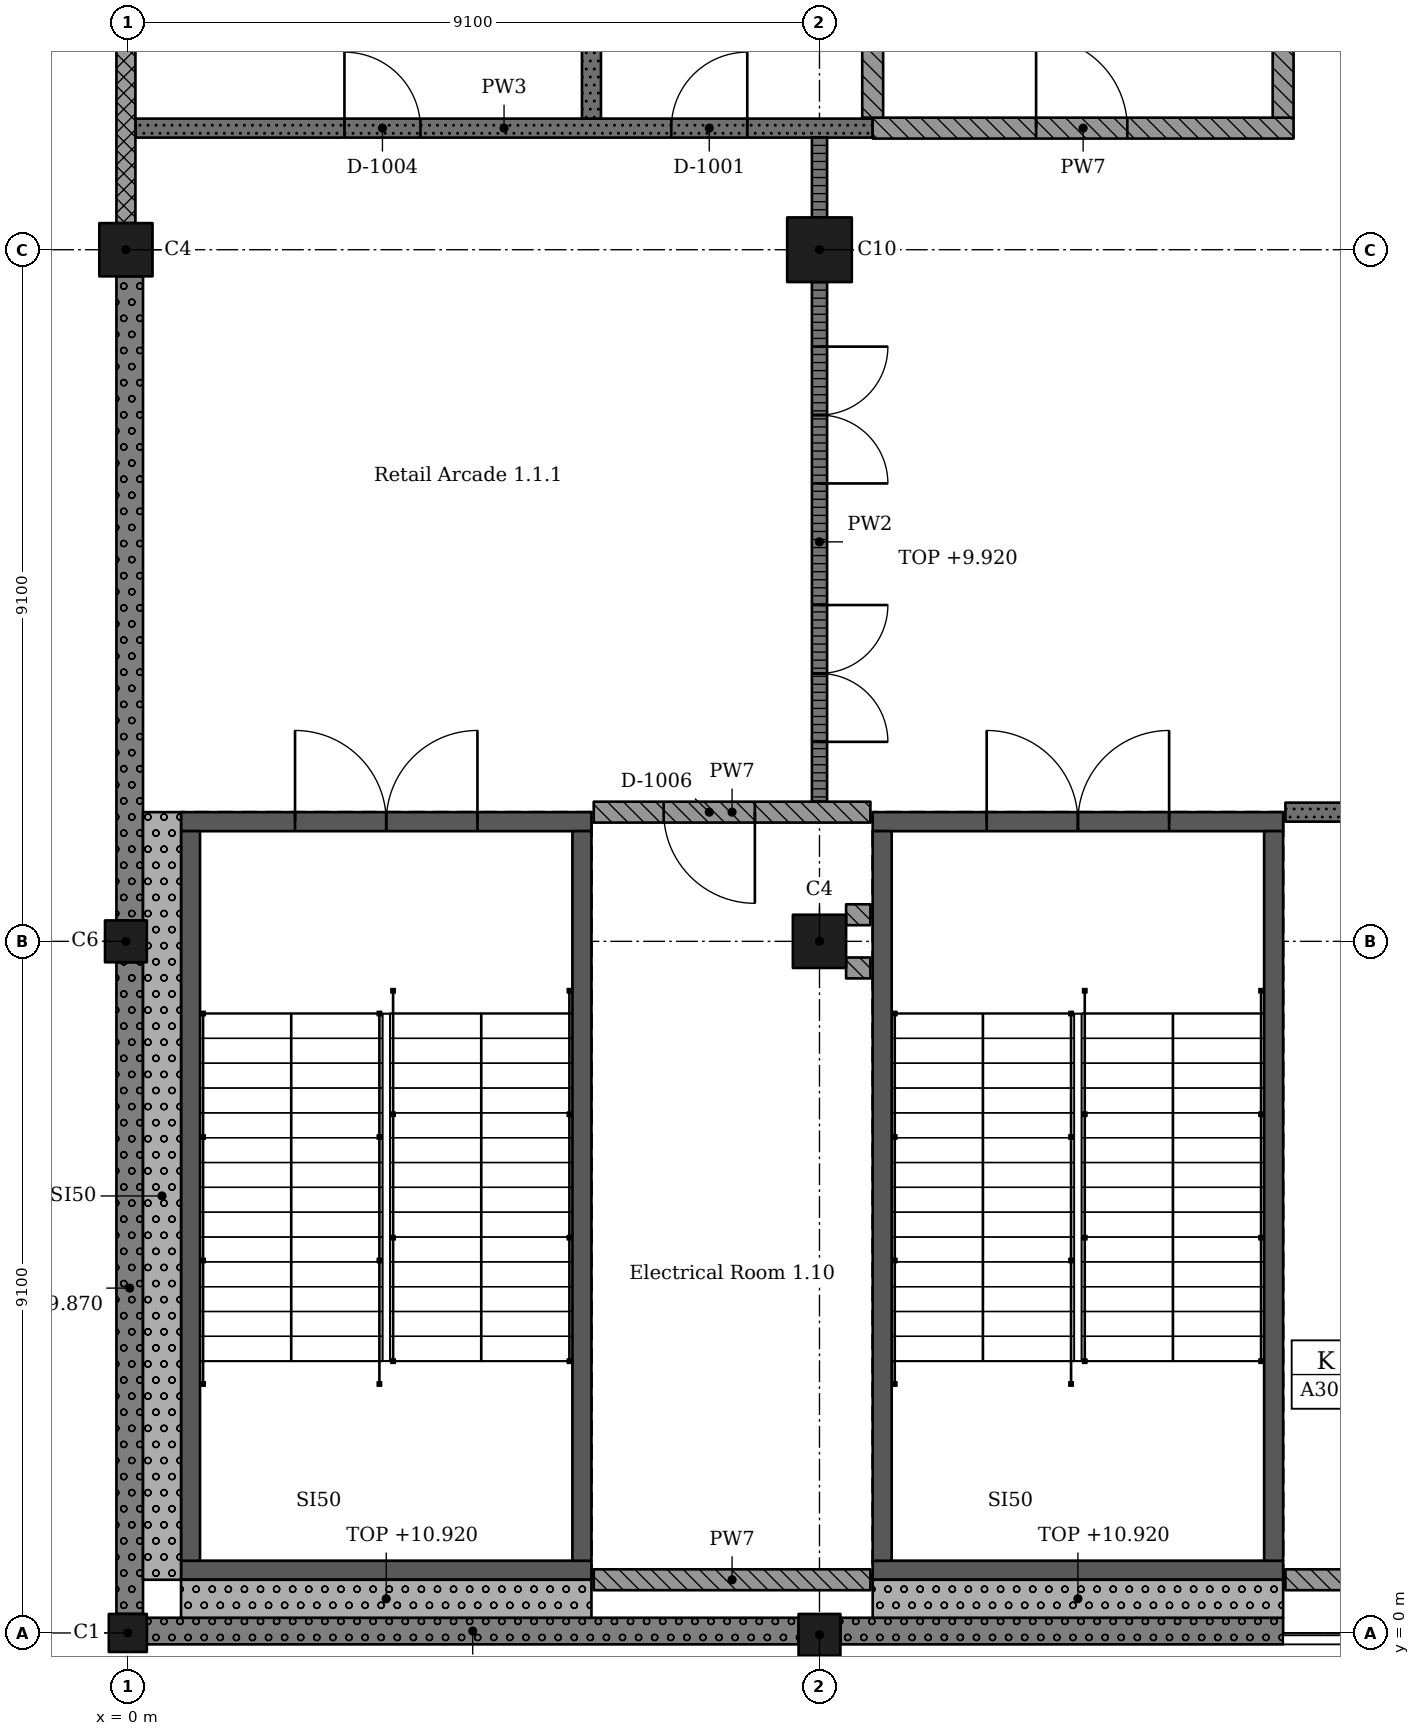
"""IFC4 building model, lengths in metres.
Left out: names, types, materials, properties, quantities, classifications, styles, units other than length and angle.
Written with IfcOpenShell. Run it as: python <this file> out.ifc"""

import sys

from ifc_helpers import new_model, si_unit, direction, frame, frame_2d, origin, origin_with_axes, origin_2d, place, context, subcontext, project, spatial, rectangle, extrude, element, fill, save


model = new_model("IFC4")
c1 = context("Model", 3, precision=1e-05, world=origin(), true_north=direction((0.0, 1.0)))
c2 = subcontext(c1, "Body", "Model", "MODEL_VIEW")
j1 = project(units=[si_unit("LENGTHUNIT", "METRE"), si_unit("PLANEANGLEUNIT", "RADIAN")], contexts=[c1])
p1 = place(None, origin())
s1 = spatial("IfcSite", under=j1, at=p1, CompositionType="ELEMENT")
p2 = place(p1, origin())
s2 = spatial("IfcBuilding", under=s1, at=p2, CompositionType="ELEMENT")
p3 = place(p2, frame((0.0, 0.0, 6.37)))
s3 = spatial("IfcBuildingStorey", under=s2, at=p3, CompositionType="ELEMENT", Elevation=6.37)
p4 = place(p3, origin_with_axes())
e1 = element("IfcColumn", 1, at=p4, inside=s3, PredefinedType="COLUMN", context=c2, shape_type="SweptSolid", body=[
    extrude(rectangle(XDim=0.5, YDim=0.5, at=origin_2d()), origin(), (0.0, 0.0, 1.0), 4.55),
])
p5 = place(p3, frame((-0.025, 9.1, 0.0), z_axis=(0.0, 0.0, 1.0), x_axis=(1.0, 0.0, 0.0)))
e2 = element("IfcColumn", 2, at=p5, inside=s3, PredefinedType="COLUMN", context=c2, shape_type="SweptSolid", body=[
    extrude(rectangle(XDim=0.55, YDim=0.55, at=origin_2d()), origin(), (0.0, 0.0, 1.0), 4.55),
])
p6 = place(p3, frame((-0.025, 18.2, 0.0), z_axis=(0.0, 0.0, 1.0), x_axis=(1.0, 0.0, 0.0)))
e3 = element("IfcColumn", 3, at=p6, inside=s3, PredefinedType="COLUMN", context=c2, shape_type="SweptSolid", body=[
    extrude(rectangle(XDim=0.7, YDim=0.7, at=origin_2d()), origin(), (0.0, 0.0, 1.0), 4.55),
])
p7 = place(p3, frame((9.1, -0.025, 0.0), z_axis=(0.0, 0.0, 1.0), x_axis=(1.0, 0.0, 0.0)))
e4 = element("IfcColumn", 4, at=p7, inside=s3, PredefinedType="COLUMN", context=c2, shape_type="SweptSolid", body=[
    extrude(rectangle(XDim=0.55, YDim=0.55, at=origin_2d()), origin(), (0.0, 0.0, 1.0), 4.55),
])
p8 = place(p3, frame((9.1, 9.1, 0.0), z_axis=(0.0, 0.0, 1.0), x_axis=(1.0, 0.0, 0.0)))
e5 = element("IfcColumn", 5, at=p8, inside=s3, PredefinedType="COLUMN", context=c2, shape_type="SweptSolid", body=[
    extrude(rectangle(XDim=0.7, YDim=0.7, at=origin_2d()), origin(), (0.0, 0.0, 1.0), 4.55),
])
p9 = place(p3, frame((9.1, 18.2, 0.0), z_axis=(0.0, 0.0, 1.0), x_axis=(1.0, 0.0, 0.0)))
e6 = element("IfcColumn", 6, at=p9, inside=s3, PredefinedType="COLUMN", context=c2, shape_type="SweptSolid", body=[
    extrude(rectangle(XDim=0.85, YDim=0.85, at=origin_2d()), origin(), (0.0, 0.0, 1.0), 4.55),
])
p10 = place(p3, frame((6.1, 0.825, 0.0), z_axis=(0.0, 0.0, 1.0), x_axis=(-1.0, 0.0, 0.0)))
e7 = element("IfcWall", 7, at=p10, inside=s3, PredefinedType="SHEAR", context=c2, shape_type="SweptSolid", body=[
    extrude(rectangle(XDim=5.4, YDim=0.25, at=frame_2d((2.7, 0.0))), origin(), (0.0, 0.0, 1.0), 4.55),
])
p11 = place(p3, frame((6.1, 10.675, 0.0), z_axis=(0.0, 0.0, 1.0), x_axis=(-1.0, 0.0, 0.0)))
e8 = element("IfcWall", 8, at=p11, inside=s3, PredefinedType="SHEAR", context=c2, shape_type="SweptSolid", body=[
    extrude(rectangle(XDim=5.4, YDim=0.25, at=frame_2d((2.7, 0.0))), origin(), (0.0, 0.0, 1.0), 4.55),
])
p12 = place(p11, frame((1.5, 0.0, 0.0)))
e9 = element("IfcOpeningElement", 9, at=p12, cuts=e8, PredefinedType="OPENING", context=c2, shape_type="SweptSolid", body=[
    extrude(rectangle(XDim=2.4, YDim=2.1, at=frame_2d((1.2, 1.05))), frame((0.0, 0.135, 0.0), z_axis=(0.0, -1.0, 0.0), x_axis=(1.0, 0.0, 0.0)), (0.0, 0.0, 1.0), 0.27),
])
for number, where, z_axis, x_axis in (
    (10, (0.825, 10.55, 0.0), (0.0, 0.0, 1.0), (0.0, -1.0, 0.0)),
    (11, (5.975, 10.55, 0.0), (0.0, 0.0, 1.0), (0.0, -1.0, 0.0)),
):
    element("IfcWall", number, at=place(p3, frame(where, z_axis=z_axis, x_axis=x_axis)), inside=s3, PredefinedType="SHEAR", context=c2, shape_type="SweptSolid", body=[
        extrude(rectangle(XDim=9.6, YDim=0.25, at=frame_2d((4.8, 0.0))), origin(), (0.0, 0.0, 1.0), 4.55),
    ])
p13 = place(p3, frame((15.2, 0.825, 0.0), z_axis=(0.0, 0.0, 1.0), x_axis=(-1.0, 0.0, 0.0)))
e12 = element("IfcWall", 12, at=p13, inside=s3, PredefinedType="SHEAR", context=c2, shape_type="SweptSolid", body=[
    extrude(rectangle(XDim=5.4, YDim=0.25, at=frame_2d((2.7, 0.0))), origin(), (0.0, 0.0, 1.0), 4.55),
])
p14 = place(p3, frame((15.2, 10.675, 0.0), z_axis=(0.0, 0.0, 1.0), x_axis=(-1.0, 0.0, 0.0)))
e13 = element("IfcWall", 13, at=p14, inside=s3, PredefinedType="SHEAR", context=c2, shape_type="SweptSolid", body=[
    extrude(rectangle(XDim=5.4, YDim=0.25, at=frame_2d((2.7, 0.0))), origin(), (0.0, 0.0, 1.0), 4.55),
])
p15 = place(p14, frame((1.5, 0.0, 0.0)))
e14 = element("IfcOpeningElement", 14, at=p15, cuts=e13, PredefinedType="OPENING", context=c2, shape_type="SweptSolid", body=[
    extrude(rectangle(XDim=2.4, YDim=2.1, at=frame_2d((1.2, 1.05))), frame((0.0, 0.135, 0.0), z_axis=(0.0, -1.0, 0.0), x_axis=(1.0, 0.0, 0.0)), (0.0, 0.0, 1.0), 0.27),
])
for number, where, z_axis, x_axis in (
    (15, (9.925, 10.55, 0.0), (0.0, 0.0, 1.0), (0.0, -1.0, 0.0)),
    (16, (15.075, 10.55, 0.0), (0.0, 0.0, 1.0), (0.0, -1.0, 0.0)),
):
    element("IfcWall", number, at=place(p3, frame(where, z_axis=z_axis, x_axis=x_axis)), inside=s3, PredefinedType="SHEAR", context=c2, shape_type="SweptSolid", body=[
        extrude(rectangle(XDim=9.6, YDim=0.25, at=frame_2d((4.8, 0.0))), origin(), (0.0, 0.0, 1.0), 4.55),
    ])
p16 = place(p3, frame((0.25, 0.025, 0.0), z_axis=(0.0, 0.0, 1.0), x_axis=(1.0, 0.0, 0.0)))
e17 = element("IfcWall", 17, at=p16, inside=s3, PredefinedType="SOLIDWALL", context=c2, shape_type="SweptSolid", body=[
    extrude(rectangle(XDim=8.575, YDim=0.35, at=frame_2d((4.288, 0.0))), origin(), (0.0, 0.0, 1.0), 3.5),
])
p17 = place(p3, frame((9.375, 0.025, 0.0), z_axis=(0.0, 0.0, 1.0), x_axis=(1.0, 0.0, 0.0)))
e18 = element("IfcWall", 18, at=p17, inside=s3, PredefinedType="SOLIDWALL", context=c2, shape_type="SweptSolid", body=[
    extrude(rectangle(XDim=5.825, YDim=0.35, at=frame_2d((2.913, 0.0))), origin(), (0.0, 0.0, 1.0), 3.5),
])
p18 = place(p3, frame((-0.025, 26.95, 0.0), z_axis=(0.0, 0.0, 1.0), x_axis=(0.0, -1.0, 0.0)))
e19 = element("IfcWall", 19, at=p18, inside=s3, PredefinedType="SOLIDWALL", context=c2, shape_type="SweptSolid", body=[
    extrude(rectangle(XDim=8.4, YDim=0.25, at=frame_2d((4.2, 0.0))), origin(), (0.0, 0.0, 1.0), 3.55),
])
p19 = place(p3, frame((0.025, 17.85, 0.0), z_axis=(0.0, 0.0, 1.0), x_axis=(0.0, -1.0, 0.0)))
e20 = element("IfcWall", 20, at=p19, inside=s3, PredefinedType="SOLIDWALL", context=c2, shape_type="SweptSolid", body=[
    extrude(rectangle(XDim=8.475, YDim=0.35, at=frame_2d((4.238, 0.0))), origin(), (0.0, 0.0, 1.0), 3.5),
])
p20 = place(p3, frame((0.025, 8.825, 0.0), z_axis=(0.0, 0.0, 1.0), x_axis=(0.0, -1.0, 0.0)))
e21 = element("IfcWall", 21, at=p20, inside=s3, PredefinedType="SOLIDWALL", context=c2, shape_type="SweptSolid", body=[
    extrude(rectangle(XDim=8.575, YDim=0.35, at=frame_2d((4.288, 0.0))), origin(), (0.0, 0.0, 1.0), 3.5),
])
p21 = place(p3, frame((0.7, 0.45, 0.0), z_axis=(0.0, 0.0, 1.0), x_axis=(1.0, 0.0, 0.0)))
e22 = element("IfcWall", 22, at=p21, inside=s3, PredefinedType="SOLIDWALL", context=c2, shape_type="SweptSolid", body=[
    extrude(rectangle(XDim=5.4, YDim=0.5, at=frame_2d((2.7, 0.0))), origin(), (0.0, 0.0, 1.0), 4.55),
])
p22 = place(p3, frame((0.45, 0.7, 0.0), z_axis=(0.0, 0.0, 1.0), x_axis=(0.0, 1.0, 0.0)))
e23 = element("IfcWall", 23, at=p22, inside=s3, PredefinedType="SOLIDWALL", context=c2, shape_type="SweptSolid", body=[
    extrude(rectangle(XDim=10.1, YDim=0.5, at=frame_2d((5.05, 0.0))), origin(), (0.0, 0.0, 1.0), 4.25),
])
p23 = place(p3, frame((9.8, 0.45, 0.0), z_axis=(0.0, 0.0, 1.0), x_axis=(1.0, 0.0, 0.0)))
e24 = element("IfcWall", 24, at=p23, inside=s3, PredefinedType="SOLIDWALL", context=c2, shape_type="SweptSolid", body=[
    extrude(rectangle(XDim=5.4, YDim=0.5, at=frame_2d((2.7, 0.0))), origin(), (0.0, 0.0, 1.0), 4.55),
])
p24 = place(p3, frame((0.1, 19.8, 0.0), z_axis=(0.0, 0.0, 1.0), x_axis=(1.0, 0.0, 0.0)))
e25 = element("IfcWall", 25, at=p24, inside=s3, PredefinedType="SOLIDWALL", context=c2, shape_type="SweptSolid", body=[
    extrude(rectangle(XDim=9.7, YDim=0.25, at=frame_2d((4.85, 0.0))), origin(), (0.0, 0.0, 1.0), 4.25),
])
p25 = place(p24, frame((7.05, 0.0, 0.0)))
e26 = element("IfcOpeningElement", 26, at=p25, cuts=e25, PredefinedType="OPENING", context=c2, shape_type="SweptSolid", body=[
    extrude(rectangle(XDim=1.0, YDim=2.1, at=frame_2d((0.5, 1.05))), frame((0.0, 0.135, 0.0), z_axis=(0.0, -1.0, 0.0), x_axis=(1.0, 0.0, 0.0)), (0.0, 0.0, 1.0), 0.27),
])
p26 = place(p24, frame((2.75, 0.0, 0.0)))
e27 = element("IfcOpeningElement", 27, at=p26, cuts=e25, PredefinedType="OPENING", context=c2, shape_type="SweptSolid", body=[
    extrude(rectangle(XDim=1.0, YDim=2.1, at=frame_2d((0.5, 1.05))), frame((0.0, 0.135, 0.0), z_axis=(0.0, -1.0, 0.0), x_axis=(1.0, 0.0, 0.0)), (0.0, 0.0, 1.0), 0.27),
])
p27 = place(p3, frame((6.1, 29.775, 0.0), z_axis=(0.0, 0.0, 1.0), x_axis=(0.0, -1.0, 0.0)))
e28 = element("IfcWall", 28, at=p27, inside=s3, PredefinedType="SOLIDWALL", context=c2, shape_type="SweptSolid", body=[
    extrude(rectangle(XDim=9.85, YDim=0.25, at=frame_2d((4.925, 0.0))), origin(), (0.0, 0.0, 1.0), 4.25),
])
p28 = place(p3, frame((6.13, 10.8, 0.0), z_axis=(0.0, 0.0, 1.0), x_axis=(1.0, 0.0, 0.0)))
e29 = element("IfcWall", 29, at=p28, inside=s3, PredefinedType="SOLIDWALL", context=c2, shape_type="SweptSolid", body=[
    extrude(rectangle(XDim=3.64, YDim=0.275, at=frame_2d((1.82, 0.0))), origin(), (0.0, 0.0, 1.0), 4.25),
])
p29 = place(p28, frame((0.92, 0.0, 0.0)))
e30 = element("IfcOpeningElement", 30, at=p29, cuts=e29, PredefinedType="OPENING", context=c2, shape_type="SweptSolid", body=[
    extrude(rectangle(XDim=1.2, YDim=2.4, at=frame_2d((0.6, 1.2))), frame((0.0, 0.147, 0.0), z_axis=(0.0, -1.0, 0.0), x_axis=(1.0, 0.0, 0.0)), (0.0, 0.0, 1.0), 0.295),
])
p30 = place(p3, frame((9.1, 17.775, 0.0), z_axis=(0.0, 0.0, 1.0), x_axis=(0.0, -1.0, 0.0)))
e31 = element("IfcWall", 31, at=p30, inside=s3, PredefinedType="PARTITIONING", context=c2, shape_type="SweptSolid", body=[
    extrude(rectangle(XDim=6.837, YDim=0.2, at=frame_2d((3.419, 0.0))), origin(), (0.0, 0.0, 1.0), 3.55),
])
p31 = place(p30, frame((0.85, 0.0, 0.0)))
e32 = element("IfcOpeningElement", 32, at=p31, cuts=e31, PredefinedType="OPENING", context=c2, shape_type="SweptSolid", body=[
    extrude(rectangle(XDim=1.8, YDim=2.4, at=frame_2d((0.9, 1.2))), frame((0.0, 0.11, 0.0), z_axis=(0.0, -1.0, 0.0), x_axis=(1.0, 0.0, 0.0)), (0.0, 0.0, 1.0), 0.22),
])
p32 = place(p30, frame((4.25, 0.0, 0.0)))
e33 = element("IfcOpeningElement", 33, at=p32, cuts=e31, PredefinedType="OPENING", context=c2, shape_type="SweptSolid", body=[
    extrude(rectangle(XDim=1.8, YDim=2.4, at=frame_2d((0.9, 1.2))), frame((0.0, 0.11, 0.0), z_axis=(0.0, -1.0, 0.0), x_axis=(1.0, 0.0, 0.0)), (0.0, 0.0, 1.0), 0.22),
])
p33 = place(p3, frame((9.1, 19.675, 0.0), z_axis=(0.0, 0.0, 1.0), x_axis=(0.0, -1.0, 0.0)))
e34 = element("IfcWall", 34, at=p33, inside=s3, PredefinedType="PARTITIONING", context=c2, shape_type="SweptSolid", body=[
    extrude(rectangle(XDim=1.05, YDim=0.2, at=frame_2d((0.525, 0.0))), origin(), (0.0, 0.0, 1.0), 3.55),
])
p34 = place(p3, frame((9.45, 8.75, 0.0), z_axis=(0.0, 0.0, 1.0), x_axis=(1.0, 0.0, 0.0)))
e35 = element("IfcWall", 35, at=p34, inside=s3, PredefinedType="SOLIDWALL", context=c2, shape_type="SweptSolid", body=[
    extrude(rectangle(XDim=0.32, YDim=0.275, at=frame_2d((0.16, 0.0))), origin(), (0.0, 0.0, 1.0), 4.25),
])
p35 = place(p3, frame((9.77, 0.7, 0.0), z_axis=(0.0, 0.0, 1.0), x_axis=(-1.0, 0.0, 0.0)))
e36 = element("IfcWall", 36, at=p35, inside=s3, PredefinedType="SOLIDWALL", context=c2, shape_type="SweptSolid", body=[
    extrude(rectangle(XDim=3.64, YDim=0.275, at=frame_2d((1.82, 0.0))), origin(), (0.0, 0.0, 1.0), 4.25),
])
p36 = place(p3, frame((9.77, 9.45, 0.0), z_axis=(0.0, 0.0, 1.0), x_axis=(-1.0, 0.0, 0.0)))
e37 = element("IfcWall", 37, at=p36, inside=s3, PredefinedType="SOLIDWALL", context=c2, shape_type="SweptSolid", body=[
    extrude(rectangle(XDim=0.32, YDim=0.275, at=frame_2d((0.16, 0.0))), origin(), (0.0, 0.0, 1.0), 4.25),
])
p37 = place(p3, frame((9.8, 19.8, 0.0), z_axis=(0.0, 0.0, 1.0), x_axis=(1.0, 0.0, 0.0)))
e38 = element("IfcWall", 38, at=p37, inside=s3, PredefinedType="SOLIDWALL", context=c2, shape_type="SweptSolid", body=[
    extrude(rectangle(XDim=5.537, YDim=0.275, at=frame_2d((2.769, 0.0))), origin(), (0.0, 0.0, 1.0), 4.25),
])
p38 = place(p37, frame((2.15, 0.0, 0.0)))
e39 = element("IfcOpeningElement", 39, at=p38, cuts=e38, PredefinedType="OPENING", context=c2, shape_type="SweptSolid", body=[
    extrude(rectangle(XDim=1.2, YDim=2.4, at=frame_2d((0.6, 1.2))), frame((0.0, 0.147, 0.0), z_axis=(0.0, -1.0, 0.0), x_axis=(1.0, 0.0, 0.0)), (0.0, 0.0, 1.0), 0.295),
])
p39 = place(p3, frame((9.8, 19.938, 0.0), z_axis=(0.0, 0.0, 1.0), x_axis=(0.0, 1.0, 0.0)))
e40 = element("IfcWall", 40, at=p39, inside=s3, PredefinedType="SOLIDWALL", context=c2, shape_type="SweptSolid", body=[
    extrude(rectangle(XDim=6.938, YDim=0.275, at=frame_2d((3.469, 0.0))), origin(), (0.0, 0.0, 1.0), 4.25),
])
p40 = place(p3, frame((15.2, 29.762, 0.0), z_axis=(0.0, 0.0, 1.0), x_axis=(0.0, -1.0, 0.0)))
e41 = element("IfcWall", 41, at=p40, inside=s3, PredefinedType="SOLIDWALL", context=c2, shape_type="SweptSolid", body=[
    extrude(rectangle(XDim=9.825, YDim=0.275, at=frame_2d((4.913, 0.0))), origin(), (0.0, 0.0, 1.0), 4.25),
])
p41 = place(p3, frame((18.87, 0.7, 0.0), z_axis=(0.0, 0.0, 1.0), x_axis=(-1.0, 0.0, 0.0)))
e42 = element("IfcWall", 42, at=p41, inside=s3, PredefinedType="SOLIDWALL", context=c2, shape_type="SweptSolid", body=[
    extrude(rectangle(XDim=3.64, YDim=0.275, at=frame_2d((1.82, 0.0))), origin(), (0.0, 0.0, 1.0), 4.25),
])
p42 = place(p3, frame((18.87, 10.8, 0.0), z_axis=(0.0, 0.0, 1.0), x_axis=(-1.0, 0.0, 0.0)))
e43 = element("IfcWall", 43, at=p42, inside=s3, PredefinedType="SOLIDWALL", context=c2, shape_type="SweptSolid", body=[
    extrude(rectangle(XDim=3.64, YDim=0.25, at=frame_2d((1.82, 0.0))), origin(), (0.0, 0.0, 1.0), 4.25),
])
p43 = place(p42, frame((1.35, 0.0, 0.0)))
e44 = element("IfcOpeningElement", 44, at=p43, cuts=e43, PredefinedType="OPENING", context=c2, shape_type="SweptSolid", body=[
    extrude(rectangle(XDim=1.0, YDim=2.1, at=frame_2d((0.5, 1.05))), frame((0.0, 0.135, 0.0), z_axis=(0.0, -1.0, 0.0), x_axis=(1.0, 0.0, 0.0)), (0.0, 0.0, 1.0), 0.27),
])
p44 = place(p25, origin())
e45 = element("IfcDoor", 45, at=p44, inside=s3, OperationType="SINGLE_SWING_LEFT", PredefinedType="DOOR", context=c2, shape_type="SweptSolid", body=[
    extrude(rectangle(XDim=1.0, YDim=2.1, at=frame_2d((0.5, 1.05))), frame((0.0, 0.025, 0.0), z_axis=(0.0, -1.0, 0.0), x_axis=(1.0, 0.0, 0.0)), (0.0, 0.0, 1.0), 0.05),
])
fill(e26, e45)
p45 = place(p26, origin())
e46 = element("IfcDoor", 46, at=p45, inside=s3, OperationType="SINGLE_SWING_RIGHT", PredefinedType="DOOR", context=c2, shape_type="SweptSolid", body=[
    extrude(rectangle(XDim=1.0, YDim=2.1, at=frame_2d((0.5, 1.05))), frame((0.0, 0.025, 0.0), z_axis=(0.0, -1.0, 0.0), x_axis=(1.0, 0.0, 0.0)), (0.0, 0.0, 1.0), 0.05),
])
fill(e27, e46)
p46 = place(p38, origin())
e47 = element("IfcDoor", 47, at=p46, inside=s3, OperationType="SINGLE_SWING_RIGHT", PredefinedType="DOOR", context=c2, shape_type="SweptSolid", body=[
    extrude(rectangle(XDim=1.2, YDim=2.4, at=frame_2d((0.6, 1.2))), frame((0.0, 0.025, 0.0), z_axis=(0.0, -1.0, 0.0), x_axis=(1.0, 0.0, 0.0)), (0.0, 0.0, 1.0), 0.05),
])
fill(e39, e47)
p47 = place(p29, origin())
e48 = element("IfcDoor", 48, at=p47, inside=s3, OperationType="SINGLE_SWING_RIGHT", PredefinedType="DOOR", context=c2, shape_type="SweptSolid", body=[
    extrude(rectangle(XDim=1.2, YDim=2.4, at=frame_2d((0.6, 1.2))), frame((0.0, 0.025, 0.0), z_axis=(0.0, -1.0, 0.0), x_axis=(1.0, 0.0, 0.0)), (0.0, 0.0, 1.0), 0.05),
])
fill(e30, e48)
p48 = place(p31, origin())
e49 = element("IfcDoor", 49, at=p48, inside=s3, OperationType="DOUBLE_DOOR_SINGLE_SWING", PredefinedType="DOOR", context=c2, shape_type="SweptSolid", body=[
    extrude(rectangle(XDim=1.8, YDim=2.4, at=frame_2d((0.9, 1.2))), frame((0.0, 0.025, 0.0), z_axis=(0.0, -1.0, 0.0), x_axis=(1.0, 0.0, 0.0)), (0.0, 0.0, 1.0), 0.05),
])
fill(e32, e49)
p49 = place(p32, origin())
e50 = element("IfcDoor", 50, at=p49, inside=s3, OperationType="DOUBLE_DOOR_SINGLE_SWING", PredefinedType="DOOR", context=c2, shape_type="SweptSolid", body=[
    extrude(rectangle(XDim=1.8, YDim=2.4, at=frame_2d((0.9, 1.2))), frame((0.0, 0.025, 0.0), z_axis=(0.0, -1.0, 0.0), x_axis=(1.0, 0.0, 0.0)), (0.0, 0.0, 1.0), 0.05),
])
fill(e33, e50)
p50 = place(p12, origin())
e51 = element("IfcDoor", 51, at=p50, inside=s3, OperationType="DOUBLE_DOOR_SINGLE_SWING", PredefinedType="DOOR", context=c2, shape_type="SweptSolid", body=[
    extrude(rectangle(XDim=2.4, YDim=2.1, at=frame_2d((1.2, 1.05))), frame((0.0, 0.025, 0.0), z_axis=(0.0, -1.0, 0.0), x_axis=(1.0, 0.0, 0.0)), (0.0, 0.0, 1.0), 0.05),
])
fill(e9, e51)
p51 = place(p15, origin())
e52 = element("IfcDoor", 52, at=p51, inside=s3, OperationType="DOUBLE_DOOR_SINGLE_SWING", PredefinedType="DOOR", context=c2, shape_type="SweptSolid", body=[
    extrude(rectangle(XDim=2.4, YDim=2.1, at=frame_2d((1.2, 1.05))), frame((0.0, 0.025, 0.0), z_axis=(0.0, -1.0, 0.0), x_axis=(1.0, 0.0, 0.0)), (0.0, 0.0, 1.0), 0.05),
])
fill(e14, e52)
save(model, sys.argv[1])
